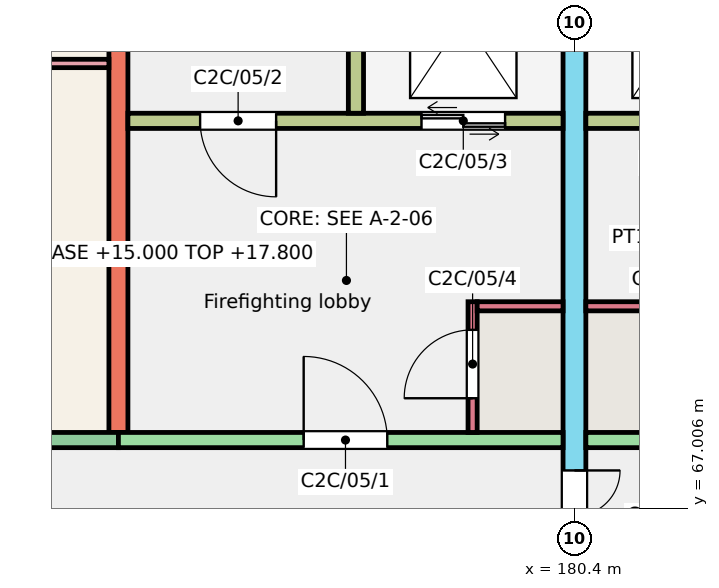
"""IFC4 building model, lengths in metres.
Left out: names, types, materials, properties, quantities, classifications, styles, units other than length and angle.
Written with IfcOpenShell. Run it as: python <this file> out.ifc"""

import sys

from ifc_helpers import new_model, si_unit, direction, frame, frame_2d, origin, place, context, subcontext, project, spatial, rectangle, extrude, element, fill, save


model = new_model("IFC4")
c1 = context("Model", 3, precision=1e-05, world=origin(), true_north=direction((0.0, 1.0)))
c2 = subcontext(c1, "Body", "Model", "MODEL_VIEW")
j1 = project(units=[si_unit("LENGTHUNIT", "METRE"), si_unit("PLANEANGLEUNIT", "RADIAN")], contexts=[c1])
p1 = place(None, origin())
s1 = spatial("IfcSite", under=j1, at=p1, CompositionType="ELEMENT")
p2 = place(p1, origin())
s2 = spatial("IfcBuilding", under=s1, at=p2, CompositionType="ELEMENT")
p3 = place(p2, frame((0.0, 0.0, 15.0)))
s3 = spatial("IfcBuildingStorey", under=s2, at=p3, CompositionType="ELEMENT", Elevation=15.0)
p4 = place(p3, frame((174.4, 68.0, 0.0), z_axis=(0.0, 0.0, 1.0), x_axis=(0.0, 1.0, 0.0)))
e1 = element("IfcWall", 1, at=p4, inside=s3, PredefinedType="SHEAR", context=c2, shape_type="SweptSolid", body=[
    extrude(rectangle(XDim=9.0, YDim=0.25, at=frame_2d((4.5, 0.0))), origin(), (0.0, 0.0, 1.0), 3.0),
])
p5 = place(p3, frame((180.4, 66.0, 0.0), z_axis=(0.0, 0.0, 1.0), x_axis=(0.0, 1.0, 0.0)))
e2 = element("IfcWall", 2, at=p5, inside=s3, PredefinedType="SHEAR", context=c2, shape_type="SweptSolid", body=[
    extrude(rectangle(XDim=11.0, YDim=0.3, at=frame_2d((5.5, 0.0))), origin(), (0.0, 0.0, 1.0), 3.0),
])
p6 = place(p5, frame((0.3, 0.0, 0.0)))
e3 = element("IfcOpeningElement", 3, at=p6, cuts=e2, PredefinedType="OPENING", context=c2, shape_type="SweptSolid", body=[
    extrude(rectangle(XDim=1.2, YDim=2.1, at=frame_2d((0.6, 1.05))), frame((0.0, 0.16, 0.0), z_axis=(0.0, -1.0, 0.0), x_axis=(1.0, 0.0, 0.0)), (0.0, 0.0, 1.0), 0.32),
])
p7 = place(p3, frame((170.8, 67.9, 0.0), z_axis=(0.0, 0.0, 1.0), x_axis=(1.0, 0.0, 0.0)))
e4 = element("IfcWall", 4, at=p7, inside=s3, PredefinedType="SOLIDWALL", context=c2, shape_type="SweptSolid", body=[
    extrude(rectangle(XDim=3.6, YDim=0.2, at=frame_2d((1.8, 0.0))), origin(), (0.0, 0.0, 1.0), 3.0),
])
p8 = place(p7, frame((1.038, 0.0, 0.9)))
e5 = element("IfcOpeningElement", 5, at=p8, cuts=e4, PredefinedType="OPENING", context=c2, shape_type="SweptSolid", body=[
    extrude(rectangle(XDim=1.5, YDim=1.5, at=frame_2d((0.75, 0.75))), frame((0.0, 0.11, 0.0), z_axis=(0.0, -1.0, 0.0), x_axis=(1.0, 0.0, 0.0)), (0.0, 0.0, 1.0), 0.22),
])
p9 = place(p3, frame((174.4, 67.9, 0.0), z_axis=(0.0, 0.0, 1.0), x_axis=(1.0, 0.0, 0.0)))
e6 = element("IfcWall", 6, at=p9, inside=s3, PredefinedType="SHEAR", context=c2, shape_type="SweptSolid", body=[
    extrude(rectangle(XDim=5.85, YDim=0.2, at=frame_2d((2.925, 0.0))), origin(), (0.0, 0.0, 1.0), 3.0),
])
p10 = place(p9, frame((2.438, 0.0, 0.0)))
e7 = element("IfcOpeningElement", 7, at=p10, cuts=e6, PredefinedType="OPENING", context=c2, shape_type="SweptSolid", body=[
    extrude(rectangle(XDim=1.1, YDim=2.1, at=frame_2d((0.55, 1.05))), frame((0.0, 0.11, 0.0), z_axis=(0.0, -1.0, 0.0), x_axis=(1.0, 0.0, 0.0)), (0.0, 0.0, 1.0), 0.22),
])
p11 = place(p3, frame((174.525, 72.1, 0.0), z_axis=(0.0, 0.0, 1.0), x_axis=(1.0, 0.0, 0.0)))
e8 = element("IfcWall", 8, at=p11, inside=s3, PredefinedType="SHEAR", context=c2, shape_type="SweptSolid", body=[
    extrude(rectangle(XDim=5.725, YDim=0.2, at=frame_2d((2.863, 0.0))), origin(), (0.0, 0.0, 1.0), 3.0),
])
p12 = place(p11, frame((0.95, 0.0, 0.0)))
e9 = element("IfcOpeningElement", 9, at=p12, cuts=e8, PredefinedType="OPENING", context=c2, shape_type="SweptSolid", body=[
    extrude(rectangle(XDim=1.0, YDim=2.1, at=frame_2d((0.5, 1.05))), frame((0.0, 0.11, 0.0), z_axis=(0.0, -1.0, 0.0), x_axis=(1.0, 0.0, 0.0)), (0.0, 0.0, 1.0), 0.22),
])
p13 = place(p11, frame((3.863, 0.0, 0.0)))
e10 = element("IfcOpeningElement", 10, at=p13, cuts=e8, PredefinedType="OPENING", context=c2, shape_type="SweptSolid", body=[
    extrude(rectangle(XDim=1.1, YDim=2.1, at=frame_2d((0.55, 1.05))), frame((0.0, 0.11, 0.0), z_axis=(0.0, -1.0, 0.0), x_axis=(1.0, 0.0, 0.0)), (0.0, 0.0, 1.0), 0.22),
])
p14 = place(p3, frame((177.525, 72.2, 0.0), z_axis=(0.0, 0.0, 1.0), x_axis=(0.0, 1.0, 0.0)))
e11 = element("IfcWall", 11, at=p14, inside=s3, PredefinedType="SHEAR", context=c2, shape_type="SweptSolid", body=[
    extrude(rectangle(XDim=4.8, YDim=0.2, at=frame_2d((2.4, 0.0))), origin(), (0.0, 0.0, 1.0), 3.0),
])
p15 = place(p3, frame((179.06, 68.0, 0.0), z_axis=(0.0, 0.0, 1.0), x_axis=(0.0, 1.0, 0.0)))
e12 = element("IfcWall", 12, at=p15, inside=s3, PredefinedType="SHEAR", context=c2, shape_type="SweptSolid", body=[
    extrude(rectangle(XDim=1.72, YDim=0.12, at=frame_2d((0.86, 0.0))), origin(), (0.0, 0.0, 1.0), 3.0),
])
p16 = place(p15, frame((0.45, 0.0, 0.0)))
e13 = element("IfcOpeningElement", 13, at=p16, cuts=e12, PredefinedType="OPENING", context=c2, shape_type="SweptSolid", body=[
    extrude(rectangle(XDim=0.9, YDim=2.1, at=frame_2d((0.45, 1.05))), frame((0.0, 0.07, 0.0), z_axis=(0.0, -1.0, 0.0), x_axis=(1.0, 0.0, 0.0)), (0.0, 0.0, 1.0), 0.14),
])
p17 = place(p3, frame((179.12, 69.66, 0.0), z_axis=(0.0, 0.0, 1.0), x_axis=(1.0, 0.0, 0.0)))
e14 = element("IfcWall", 14, at=p17, inside=s3, PredefinedType="SHEAR", context=c2, shape_type="SweptSolid", body=[
    extrude(rectangle(XDim=1.13, YDim=0.12, at=frame_2d((0.565, 0.0))), origin(), (0.0, 0.0, 1.0), 3.0),
])
p18 = place(p3, frame((180.55, 67.9, 0.0), z_axis=(0.0, 0.0, 1.0), x_axis=(1.0, 0.0, 0.0)))
e15 = element("IfcWall", 15, at=p18, inside=s3, PredefinedType="SHEAR", context=c2, shape_type="SweptSolid", body=[
    extrude(rectangle(XDim=5.85, YDim=0.2, at=frame_2d((2.925, 0.0))), origin(), (0.0, 0.0, 1.0), 3.0),
])
p19 = place(p18, frame((2.312, 0.0, 0.0)))
e16 = element("IfcOpeningElement", 16, at=p19, cuts=e15, PredefinedType="OPENING", context=c2, shape_type="SweptSolid", body=[
    extrude(rectangle(XDim=1.1, YDim=2.1, at=frame_2d((0.55, 1.05))), frame((0.0, 0.11, 0.0), z_axis=(0.0, -1.0, 0.0), x_axis=(1.0, 0.0, 0.0)), (0.0, 0.0, 1.0), 0.22),
])
p20 = place(p3, frame((180.55, 72.1, 0.0), z_axis=(0.0, 0.0, 1.0), x_axis=(1.0, 0.0, 0.0)))
e17 = element("IfcWall", 17, at=p20, inside=s3, PredefinedType="SHEAR", context=c2, shape_type="SweptSolid", body=[
    extrude(rectangle(XDim=5.725, YDim=0.2, at=frame_2d((2.862, 0.0))), origin(), (0.0, 0.0, 1.0), 3.0),
])
p21 = place(p20, frame((3.775, 0.0, 0.0)))
e18 = element("IfcOpeningElement", 18, at=p21, cuts=e17, PredefinedType="OPENING", context=c2, shape_type="SweptSolid", body=[
    extrude(rectangle(XDim=1.0, YDim=2.1, at=frame_2d((0.5, 1.05))), frame((0.0, 0.11, 0.0), z_axis=(0.0, -1.0, 0.0), x_axis=(1.0, 0.0, 0.0)), (0.0, 0.0, 1.0), 0.22),
])
p22 = place(p20, frame((0.762, 0.0, 0.0)))
e19 = element("IfcOpeningElement", 19, at=p22, cuts=e17, PredefinedType="OPENING", context=c2, shape_type="SweptSolid", body=[
    extrude(rectangle(XDim=1.1, YDim=2.1, at=frame_2d((0.55, 1.05))), frame((0.0, 0.11, 0.0), z_axis=(0.0, -1.0, 0.0), x_axis=(1.0, 0.0, 0.0)), (0.0, 0.0, 1.0), 0.22),
])
p23 = place(p3, frame((180.55, 69.66, 0.0), z_axis=(0.0, 0.0, 1.0), x_axis=(1.0, 0.0, 0.0)))
e20 = element("IfcWall", 20, at=p23, inside=s3, PredefinedType="SHEAR", context=c2, shape_type="SweptSolid", body=[
    extrude(rectangle(XDim=1.13, YDim=0.12, at=frame_2d((0.565, 0.0))), origin(), (0.0, 0.0, 1.0), 3.0),
])
p24 = place(p3, frame((170.9, 72.855, 0.0), z_axis=(0.0, 0.0, 1.0), x_axis=(1.0, 0.0, 0.0)))
e21 = element("IfcWall", 21, at=p24, inside=s3, PredefinedType="PARTITIONING", context=c2, shape_type="SweptSolid", body=[
    extrude(rectangle(XDim=3.375, YDim=0.11, at=frame_2d((1.688, 0.0))), origin(), (0.0, 0.0, 1.0), 2.8),
])
p25 = place(p10, origin())
e22 = element("IfcDoor", 22, at=p25, inside=s3, OperationType="SINGLE_SWING_LEFT", PredefinedType="DOOR", context=c2, shape_type="SweptSolid", body=[
    extrude(rectangle(XDim=1.1, YDim=2.1, at=frame_2d((0.55, 1.05))), frame((0.0, 0.025, 0.0), z_axis=(0.0, -1.0, 0.0), x_axis=(1.0, 0.0, 0.0)), (0.0, 0.0, 1.0), 0.05),
])
fill(e7, e22)
p26 = place(p12, origin())
e23 = element("IfcDoor", 23, at=p26, inside=s3, OperationType="SINGLE_SWING_RIGHT", PredefinedType="DOOR", context=c2, shape_type="SweptSolid", body=[
    extrude(rectangle(XDim=1.0, YDim=2.1, at=frame_2d((0.5, 1.05))), frame((0.0, 0.025, 0.0), z_axis=(0.0, -1.0, 0.0), x_axis=(1.0, 0.0, 0.0)), (0.0, 0.0, 1.0), 0.05),
])
fill(e9, e23)
p27 = place(p13, origin())
e24 = element("IfcDoor", 24, at=p27, inside=s3, OperationType="DOUBLE_DOOR_SLIDING", PredefinedType="DOOR", context=c2, shape_type="SweptSolid", body=[
    extrude(rectangle(XDim=1.1, YDim=2.1, at=frame_2d((0.55, 1.05))), frame((0.0, 0.025, 0.0), z_axis=(0.0, -1.0, 0.0), x_axis=(1.0, 0.0, 0.0)), (0.0, 0.0, 1.0), 0.05),
])
fill(e10, e24)
p28 = place(p16, origin())
e25 = element("IfcDoor", 25, at=p28, inside=s3, OperationType="SINGLE_SWING_LEFT", PredefinedType="DOOR", context=c2, shape_type="SweptSolid", body=[
    extrude(rectangle(XDim=0.9, YDim=2.1, at=frame_2d((0.45, 1.05))), frame((0.0, 0.025, 0.0), z_axis=(0.0, -1.0, 0.0), x_axis=(1.0, 0.0, 0.0)), (0.0, 0.0, 1.0), 0.05),
])
fill(e13, e25)
p29 = place(p6, origin())
e26 = element("IfcDoor", 26, at=p29, inside=s3, OperationType="DOUBLE_DOOR_SINGLE_SWING", PredefinedType="DOOR", context=c2, shape_type="SweptSolid", body=[
    extrude(rectangle(XDim=1.2, YDim=2.1, at=frame_2d((0.6, 1.05))), frame((0.0, 0.025, 0.0), z_axis=(0.0, -1.0, 0.0), x_axis=(1.0, 0.0, 0.0)), (0.0, 0.0, 1.0), 0.05),
])
fill(e3, e26)
save(model, sys.argv[1])
